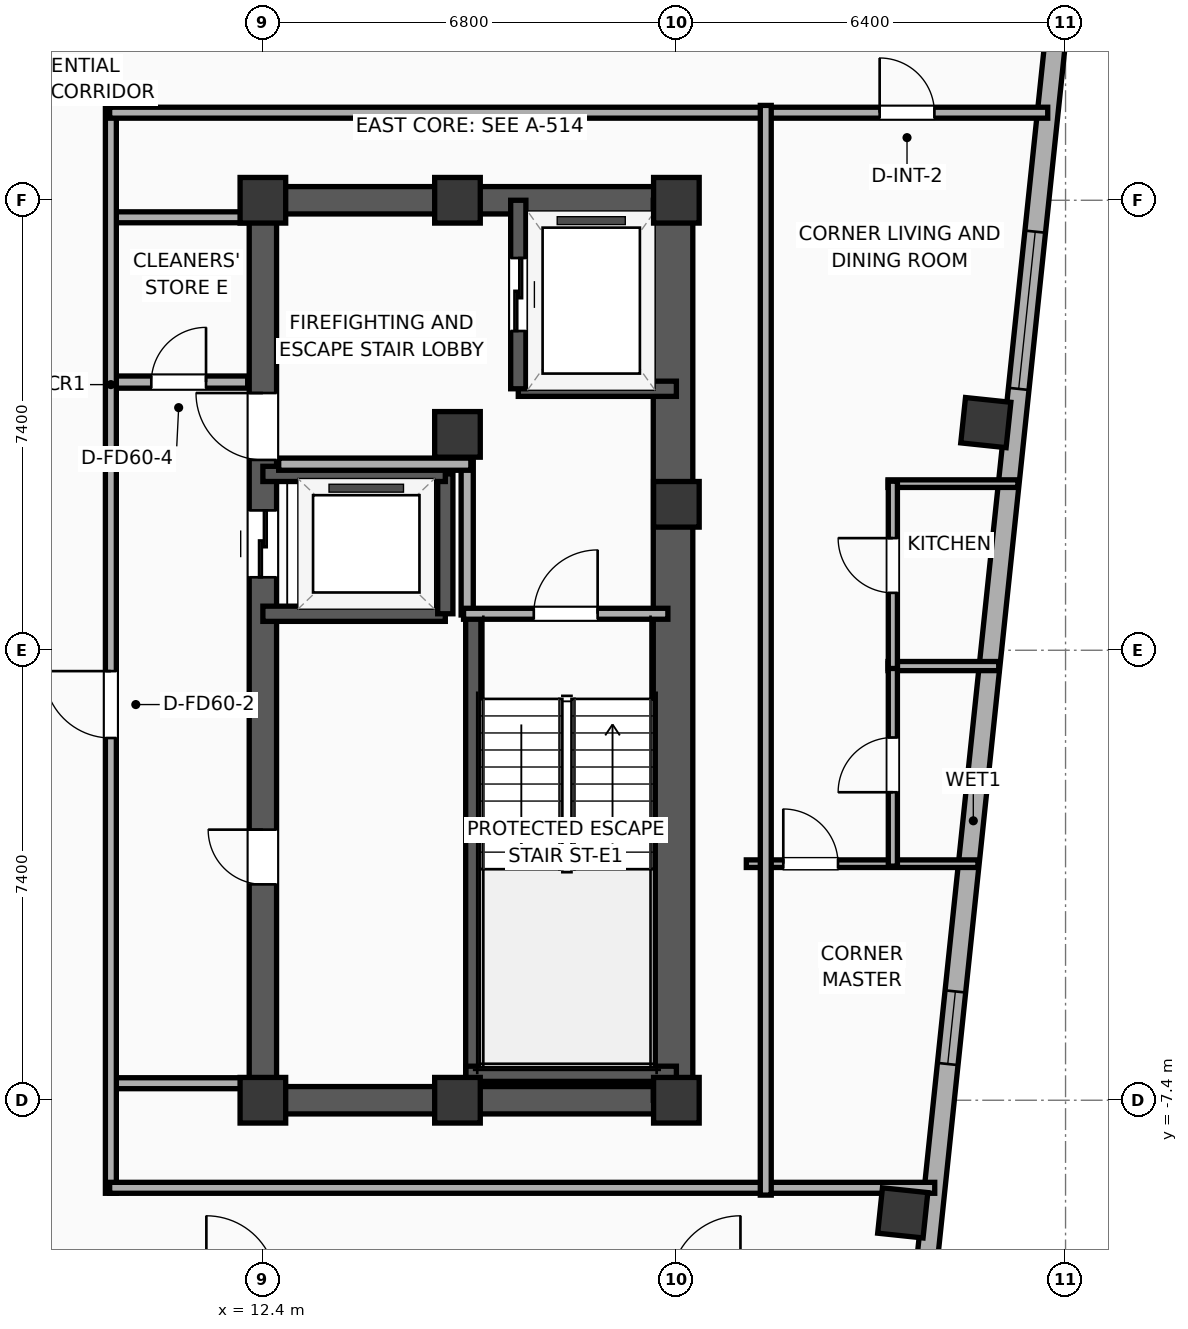
"""IFC4 building model, lengths in metres.
Left out: names, types, materials, properties, quantities, classifications, styles, units other than length and angle.
Written with IfcOpenShell. Run it as: python <this file> out.ifc"""

import sys

from ifc_helpers import new_model, si_unit, direction, frame, frame_2d, origin, origin_2d, place, context, subcontext, project, spatial, rectangle, hollow_rectangle, extrude, element, fill, save


model = new_model("IFC4")
c1 = context("Model", 3, precision=1e-05, world=origin(), true_north=direction((0.0, 1.0)))
c2 = subcontext(c1, "Body", "Model", "MODEL_VIEW")
j1 = project(units=[si_unit("LENGTHUNIT", "METRE"), si_unit("PLANEANGLEUNIT", "RADIAN")], contexts=[c1])
p1 = place(None, origin())
s1 = spatial("IfcSite", under=j1, at=p1, CompositionType="ELEMENT")
p2 = place(p1, origin())
s2 = spatial("IfcBuilding", under=s1, at=p2, CompositionType="ELEMENT")
p3 = place(p2, frame((0.0, 0.0, 306.8)))
s3 = spatial("IfcBuildingStorey", under=s2, at=p3, CompositionType="ELEMENT", Elevation=306.8)
for number, where, z_axis, x_axis in (
    (1, (12.4, -7.4, 0.0), (0.0, 0.0, 1.0), (1.0, 0.0, 0.0)),
    (2, (15.6, 3.55, 0.0), (0.0, 0.0, 1.0), (1.0, 0.0, 0.0)),
    (3, (12.4, 7.4, 0.0), (0.0, 0.0, 1.0), (1.0, 0.0, 0.0)),
    (4, (15.6, -7.4, 0.0), (0.0, 0.0, 1.0), (1.0, 0.0, 0.0)),
    (5, (15.6, 7.4, 0.0), (0.0, 0.0, 1.0), (1.0, 0.0, 0.0)),
    (6, (19.2, -7.4, 0.0), (0.0, 0.0, 1.0), (1.0, 0.0, 0.0)),
    (7, (19.2, 2.4, 0.0), (0.0, 0.0, 1.0), (1.0, 0.0, 0.0)),
    (8, (19.2, 7.4, 0.0), (0.0, 0.0, 1.0), (1.0, 0.0, 0.0)),
):
    element("IfcColumn", number, at=place(p3, frame(where, z_axis=z_axis, x_axis=x_axis)), inside=s3, PredefinedType="COLUMN", context=c2, shape_type="SweptSolid", body=[
        extrude(rectangle(XDim=0.75, YDim=0.75, at=origin_2d()), origin(), (0.0, 0.0, 1.0), 3.9),
    ])
for number, where, z_axis, x_axis in (
    (9, (12.175, -7.4, 0.0), (0.0, 0.0, 1.0), (1.0, 0.0, 0.0)),
    (10, (12.175, 7.4, 0.0), (0.0, 0.0, 1.0), (1.0, 0.0, 0.0)),
):
    element("IfcWall", number, at=place(p3, frame(where, z_axis=z_axis, x_axis=x_axis)), inside=s3, PredefinedType="SHEAR", context=c2, shape_type="SweptSolid", body=[
        extrude(rectangle(XDim=7.25, YDim=0.45, at=frame_2d((3.625, 0.0))), origin(), (0.0, 0.0, 1.0), 3.5),
    ])
p4 = place(p3, frame((12.4, -7.4, 0.0), z_axis=(0.0, 0.0, 1.0), x_axis=(0.0, 1.0, 0.0)))
e11 = element("IfcWall", 11, at=p4, inside=s3, PredefinedType="SHEAR", context=c2, shape_type="SweptSolid", body=[
    extrude(rectangle(XDim=14.8, YDim=0.45, at=frame_2d((7.4, 0.0))), origin(), (0.0, 0.0, 1.0), 3.5),
])
p5 = place(p4, frame((8.6, 0.0, 0.0)))
e12 = element("IfcOpeningElement", 12, at=p5, cuts=e11, PredefinedType="OPENING", context=c2, shape_type="SweptSolid", body=[
    extrude(rectangle(XDim=1.1, YDim=2.05, at=frame_2d((0.55, 1.025))), frame((0.0, 0.235, 0.0), z_axis=(0.0, -1.0, 0.0), x_axis=(1.0, 0.0, 0.0)), (0.0, 0.0, 1.0), 0.47),
])
p6 = place(p4, frame((10.53, 0.0, 0.0)))
e13 = element("IfcOpeningElement", 13, at=p6, cuts=e11, PredefinedType="OPENING", context=c2, shape_type="SweptSolid", body=[
    extrude(rectangle(XDim=1.1, YDim=2.05, at=frame_2d((0.55, 1.025))), frame((0.0, 0.235, 0.0), z_axis=(0.0, -1.0, 0.0), x_axis=(1.0, 0.0, 0.0)), (0.0, 0.0, 1.0), 0.47),
])
p7 = place(p4, frame((3.55, 0.0, 0.0)))
e14 = element("IfcOpeningElement", 14, at=p7, cuts=e11, PredefinedType="OPENING", context=c2, shape_type="SweptSolid", body=[
    extrude(rectangle(XDim=0.9, YDim=2.05, at=frame_2d((0.45, 1.025))), frame((0.0, 0.235, 0.0), z_axis=(0.0, -1.0, 0.0), x_axis=(1.0, 0.0, 0.0)), (0.0, 0.0, 1.0), 0.47),
])
p8 = place(p3, frame((19.145, -7.4, 0.0), z_axis=(0.0, 0.0, 1.0), x_axis=(0.0, 1.0, 0.0)))
e15 = element("IfcWall", 15, at=p8, inside=s3, PredefinedType="SHEAR", context=c2, shape_type="SweptSolid", body=[
    extrude(rectangle(XDim=14.8, YDim=0.65, at=frame_2d((7.4, 0.0))), origin(), (0.0, 0.0, 1.0), 3.5),
])
p9 = place(p3, frame((15.86, -7.085, 0.0), z_axis=(0.0, 0.0, 1.0), x_axis=(0.0, 1.0, 0.0)))
e16 = element("IfcWall", 16, at=p9, inside=s3, PredefinedType="SOLIDWALL", context=c2, shape_type="SweptSolid", body=[
    extrude(rectangle(XDim=7.685, YDim=0.25, at=frame_2d((3.843, 0.0))), origin(), (0.0, 0.0, 1.0), 3.5),
])
p10 = place(p3, frame((15.74, -6.965, 0.0), z_axis=(0.0, 0.0, 1.0), x_axis=(1.0, 0.0, 0.0)))
e17 = element("IfcWall", 17, at=p10, inside=s3, PredefinedType="SOLIDWALL", context=c2, shape_type="SweptSolid", body=[
    extrude(rectangle(XDim=3.46, YDim=0.25, at=frame_2d((1.73, 0.0))), origin(), (0.0, 0.0, 1.0), 3.5),
])
for number, where, z_axis, x_axis in (
    (18, (22.923, -9.252, 0.0), (0.0, 0.0, 1.0), (0.995, -0.105, 0.0)),
    (19, (24.289, 3.744, 0.0), (0.0, 0.0, 1.0), (0.995, -0.105, 0.0)),
):
    element("IfcColumn", number, at=place(p3, frame(where, z_axis=z_axis, x_axis=x_axis)), inside=s3, PredefinedType="COLUMN", context=c2, shape_type="SweptSolid", body=[
        extrude(hollow_rectangle(XDim=0.75, YDim=0.75, WallThickness=0.025, at=origin_2d()), origin(), (0.0, 0.0, 1.0), 3.865),
    ])
p11 = place(p3, frame((25.67, 12.296, 0.0), z_axis=(0.0, 0.0, 1.0), x_axis=(-0.104533282919, -0.994521388791, 0.0)))
e20 = element("IfcWall", 20, at=p11, inside=s3, PredefinedType="ELEMENTEDWALL", context=c2, shape_type="SweptSolid", body=[
    extrude(rectangle(XDim=30.366, YDim=0.34, at=frame_2d((15.183, 0.0))), origin(), (0.0, 0.0, 1.0), 2.39),
])
p12 = place(p11, frame((5.442, 0.0, 0.65)))
e21 = element("IfcOpeningElement", 21, at=p12, cuts=e20, PredefinedType="OPENING", context=c2, shape_type="SweptSolid", body=[
    extrude(rectangle(XDim=2.6, YDim=1.45, at=frame_2d((1.3, 0.725))), frame((0.0, 0.18, 0.0), z_axis=(0.0, -1.0, 0.0), x_axis=(1.0, 0.0, 0.0)), (0.0, 0.0, 1.0), 0.36),
])
p13 = place(p11, frame((23.125, 0.0, 0.65)))
e22 = element("IfcOpeningElement", 22, at=p13, cuts=e20, PredefinedType="OPENING", context=c2, shape_type="SweptSolid", body=[
    extrude(rectangle(XDim=2.6, YDim=1.45, at=frame_2d((1.3, 0.725))), frame((0.0, 0.18, 0.0), z_axis=(0.0, -1.0, 0.0), x_axis=(1.0, 0.0, 0.0)), (0.0, 0.0, 1.0), 0.36),
])
p14 = place(p11, frame((27.192, 0.0, 0.55)))
e23 = element("IfcOpeningElement", 23, at=p14, cuts=e20, PredefinedType="OPENING", context=c2, shape_type="SweptSolid", body=[
    extrude(rectangle(XDim=1.2, YDim=1.15, at=frame_2d((0.6, 0.575))), frame((0.0, 0.18, 0.0), z_axis=(0.0, -1.0, 0.0), x_axis=(1.0, 0.0, 0.0)), (0.0, 0.0, 1.0), 0.36),
])
p15 = place(p11, frame((18.005, 0.0, 0.55)))
e24 = element("IfcOpeningElement", 24, at=p15, cuts=e20, PredefinedType="OPENING", context=c2, shape_type="SweptSolid", body=[
    extrude(rectangle(XDim=1.2, YDim=1.15, at=frame_2d((0.6, 0.575))), frame((0.0, 0.18, 0.0), z_axis=(0.0, -1.0, 0.0), x_axis=(1.0, 0.0, 0.0)), (0.0, 0.0, 1.0), 0.36),
])
p16 = place(p3, frame((16.6, 4.3, 0.0), z_axis=(0.0, 0.0, 1.0), x_axis=(1.0, 0.0, 0.0)))
e25 = element("IfcWall", 25, at=p16, inside=s3, PredefinedType="SOLIDWALL", context=c2, shape_type="SweptSolid", body=[
    extrude(rectangle(XDim=2.6, YDim=0.25, at=frame_2d((1.3, 0.0))), origin(), (0.0, 0.0, 1.0), 3.5),
])
p17 = place(p3, frame((16.6, 7.4, 0.0), z_axis=(0.0, 0.0, 1.0), x_axis=(0.0, -1.0, 0.0)))
e26 = element("IfcWall", 26, at=p17, inside=s3, PredefinedType="SOLIDWALL", context=c2, shape_type="SweptSolid", body=[
    extrude(rectangle(XDim=3.1, YDim=0.25, at=frame_2d((1.55, 0.0))), origin(), (0.0, 0.0, 1.0), 3.5),
])
p18 = place(p17, frame((0.95, 0.0, 0.0)))
e27 = element("IfcOpeningElement", 27, at=p18, cuts=e26, PredefinedType="OPENING", context=c2, shape_type="SweptSolid", body=[
    extrude(rectangle(XDim=1.2, YDim=2.05, at=frame_2d((0.6, 1.025))), frame((0.0, 0.135, 0.0), z_axis=(0.0, -1.0, 0.0), x_axis=(1.0, 0.0, 0.0)), (0.0, 0.0, 1.0), 0.27),
])
p19 = place(p3, frame((12.4, 0.6, 0.0), z_axis=(0.0, 0.0, 1.0), x_axis=(1.0, 0.0, 0.0)))
e28 = element("IfcWall", 28, at=p19, inside=s3, PredefinedType="SOLIDWALL", context=c2, shape_type="SweptSolid", body=[
    extrude(rectangle(XDim=3.0, YDim=0.25, at=frame_2d((1.5, 0.0))), origin(), (0.0, 0.0, 1.0), 3.5),
])
p20 = place(p3, frame((15.4, 0.6, 0.0), z_axis=(0.0, 0.0, 1.0), x_axis=(0.0, 1.0, 0.0)))
e29 = element("IfcWall", 29, at=p20, inside=s3, PredefinedType="SOLIDWALL", context=c2, shape_type="SweptSolid", body=[
    extrude(rectangle(XDim=2.3, YDim=0.25, at=frame_2d((1.15, 0.0))), origin(), (0.0, 0.0, 1.0), 3.5),
])
p21 = place(p3, frame((15.4, 2.9, 0.0), z_axis=(0.0, 0.0, 1.0), x_axis=(-1.0, 0.0, 0.0)))
e30 = element("IfcWall", 30, at=p21, inside=s3, PredefinedType="SOLIDWALL", context=c2, shape_type="SweptSolid", body=[
    extrude(rectangle(XDim=3.0, YDim=0.25, at=frame_2d((1.5, 0.0))), origin(), (0.0, 0.0, 1.0), 3.5),
])
p22 = place(p3, frame((15.76, 0.58, 0.0), z_axis=(0.0, 0.0, 1.0), x_axis=(0.0, 1.0, 0.0)))
e31 = element("IfcWall", 31, at=p22, inside=s3, PredefinedType="PARTITIONING", context=c2, shape_type="SweptSolid", body=[
    extrude(rectangle(XDim=2.52, YDim=0.2, at=frame_2d((1.26, 0.0))), origin(), (0.0, 0.0, 1.0), 3.5),
])
p23 = place(p3, frame((12.66, 3.06, 0.0), z_axis=(0.0, 0.0, 1.0), x_axis=(1.0, 0.0, 0.0)))
e32 = element("IfcWall", 32, at=p23, inside=s3, PredefinedType="PARTITIONING", context=c2, shape_type="SweptSolid", body=[
    extrude(rectangle(XDim=3.16, YDim=0.2, at=frame_2d((1.58, 0.0))), origin(), (0.0, 0.0, 1.0), 3.5),
])
p24 = place(p3, frame((15.7, 0.6, 0.0), z_axis=(0.0, 0.0, 1.0), x_axis=(1.0, 0.0, 0.0)))
e33 = element("IfcWall", 33, at=p24, inside=s3, PredefinedType="PARTITIONING", context=c2, shape_type="SweptSolid", body=[
    extrude(rectangle(XDim=3.36, YDim=0.18, at=frame_2d((1.68, 0.0))), origin(), (0.0, 0.0, 1.0), 3.5),
])
p25 = place(p24, frame((1.155, 0.0, 0.0)))
e34 = element("IfcOpeningElement", 34, at=p25, cuts=e33, PredefinedType="OPENING", context=c2, shape_type="SweptSolid", body=[
    extrude(rectangle(XDim=1.05, YDim=2.05, at=frame_2d((0.525, 1.025))), frame((0.0, 0.1, 0.0), z_axis=(0.0, -1.0, 0.0), x_axis=(1.0, 0.0, 0.0)), (0.0, 0.0, 1.0), 0.2),
])
p26 = place(p3, frame((9.88, 4.41, 0.0), z_axis=(0.0, 0.0, 1.0), x_axis=(1.0, 0.0, 0.0)))
e35 = element("IfcWall", 35, at=p26, inside=s3, PredefinedType="PARTITIONING", context=c2, shape_type="SweptSolid", body=[
    extrude(rectangle(XDim=2.27, YDim=0.2, at=frame_2d((1.135, 0.0))), origin(), (0.0, 0.0, 1.0), 3.5),
])
p27 = place(p26, frame((0.685, 0.0, 0.0)))
e36 = element("IfcOpeningElement", 36, at=p27, cuts=e35, PredefinedType="OPENING", context=c2, shape_type="SweptSolid", body=[
    extrude(rectangle(XDim=0.9, YDim=2.05, at=frame_2d((0.45, 1.025))), frame((0.0, 0.11, 0.0), z_axis=(0.0, -1.0, 0.0), x_axis=(1.0, 0.0, 0.0)), (0.0, 0.0, 1.0), 0.22),
])
for number, where, z_axis, x_axis in (
    (37, (9.88, 7.12, 0.0), (0.0, 0.0, 1.0), (1.0, 0.0, 0.0)),
    (38, (9.88, -7.12, 0.0), (0.0, 0.0, 1.0), (1.0, 0.0, 0.0)),
):
    element("IfcWall", number, at=place(p3, frame(where, z_axis=z_axis, x_axis=x_axis)), inside=s3, PredefinedType="PARTITIONING", context=c2, shape_type="SweptSolid", body=[
        extrude(rectangle(XDim=2.27, YDim=0.18, at=frame_2d((1.135, 0.0))), origin(), (0.0, 0.0, 1.0), 2.54),
    ])
p28 = place(p3, frame((9.9, -8.93, 0.0), z_axis=(0.0, 0.0, 1.0), x_axis=(0.0, 1.0, 0.0)))
e39 = element("IfcWall", 39, at=p28, inside=s3, PredefinedType="PARTITIONING", context=c2, shape_type="SweptSolid", body=[
    extrude(rectangle(XDim=17.86, YDim=0.18, at=frame_2d((8.93, 0.0))), origin(), (0.0, 0.0, 1.0), 3.5),
])
p29 = place(p28, frame((7.487, 0.0, 0.0)))
e40 = element("IfcOpeningElement", 40, at=p29, cuts=e39, PredefinedType="OPENING", context=c2, shape_type="SweptSolid", body=[
    extrude(rectangle(XDim=1.1, YDim=2.05, at=frame_2d((0.55, 1.025))), frame((0.0, 0.1, 0.0), z_axis=(0.0, -1.0, 0.0), x_axis=(1.0, 0.0, 0.0)), (0.0, 0.0, 1.0), 0.2),
])
p30 = place(p3, frame((9.88, 8.84, 0.0), z_axis=(0.0, 0.0, 1.0), x_axis=(1.0, 0.0, 0.0)))
e41 = element("IfcWall", 41, at=p30, inside=s3, PredefinedType="PARTITIONING", context=c2, shape_type="SweptSolid", body=[
    extrude(rectangle(XDim=15.427, YDim=0.18, at=frame_2d((7.713, 0.0))), origin(), (0.0, 0.0, 1.0), 3.5),
])
p31 = place(p30, frame((12.663, 0.0, 0.0)))
e42 = element("IfcOpeningElement", 42, at=p31, cuts=e41, PredefinedType="OPENING", context=c2, shape_type="SweptSolid", body=[
    extrude(rectangle(XDim=0.9, YDim=2.05, at=frame_2d((0.45, 1.025))), frame((0.0, 0.1, 0.0), z_axis=(0.0, -1.0, 0.0), x_axis=(1.0, 0.0, 0.0)), (0.0, 0.0, 1.0), 0.2),
])
p32 = place(p3, frame((9.88, -8.84, 0.0), z_axis=(0.0, 0.0, 1.0), x_axis=(1.0, 0.0, 0.0)))
e43 = element("IfcWall", 43, at=p32, inside=s3, PredefinedType="PARTITIONING", context=c2, shape_type="SweptSolid", body=[
    extrude(rectangle(XDim=13.569, YDim=0.18, at=frame_2d((6.784, 0.0))), origin(), (0.0, 0.0, 1.0), 2.39),
])
p33 = place(p3, frame((22.68, 2.74, 0.0), z_axis=(0.0, 0.0, 1.0), x_axis=(1.0, 0.0, 0.0)))
e44 = element("IfcWall", 44, at=p33, inside=s3, PredefinedType="PARTITIONING", context=c2, shape_type="SweptSolid", body=[
    extrude(rectangle(XDim=2.137, YDim=0.125, at=frame_2d((1.068, 0.0))), origin(), (0.0, 0.0, 1.0), 3.5),
])
p34 = place(p3, frame((22.68, -0.26, 0.0), z_axis=(0.0, 0.0, 1.0), x_axis=(1.0, 0.0, 0.0)))
e45 = element("IfcWall", 45, at=p34, inside=s3, PredefinedType="PLUMBINGWALL", context=c2, shape_type="SweptSolid", body=[
    extrude(rectangle(XDim=1.821, YDim=0.15, at=frame_2d((0.911, 0.0))), origin(), (0.0, 0.0, 1.0), 3.5),
])
p35 = place(p3, frame((20.35, -3.51, 0.0), z_axis=(0.0, 0.0, 1.0), x_axis=(1.0, 0.0, 0.0)))
e46 = element("IfcWall", 46, at=p35, inside=s3, PredefinedType="PARTITIONING", context=c2, shape_type="SweptSolid", body=[
    extrude(rectangle(XDim=3.81, YDim=0.125, at=frame_2d((1.905, 0.0))), origin(), (0.0, 0.0, 1.0), 3.5),
])
p36 = place(p35, frame((0.608, 0.0, 0.0)))
e47 = element("IfcOpeningElement", 47, at=p36, cuts=e46, PredefinedType="OPENING", context=c2, shape_type="SweptSolid", body=[
    extrude(rectangle(XDim=0.9, YDim=2.05, at=frame_2d((0.45, 1.025))), frame((0.0, 0.073, 0.0), z_axis=(0.0, -1.0, 0.0), x_axis=(1.0, 0.0, 0.0)), (0.0, 0.0, 1.0), 0.145),
])
p37 = place(p3, frame((22.76, -3.55, 0.0), z_axis=(0.0, 0.0, 1.0), x_axis=(0.0, 1.0, 0.0)))
e48 = element("IfcWall", 48, at=p37, inside=s3, PredefinedType="PLUMBINGWALL", context=c2, shape_type="SweptSolid", body=[
    extrude(rectangle(XDim=3.33, YDim=0.15, at=frame_2d((1.665, 0.0))), origin(), (0.0, 0.0, 1.0), 3.5),
])
p38 = place(p37, frame((1.215, 0.0, 0.0)))
e49 = element("IfcOpeningElement", 49, at=p38, cuts=e48, PredefinedType="OPENING", context=c2, shape_type="SweptSolid", body=[
    extrude(rectangle(XDim=0.9, YDim=2.05, at=frame_2d((0.45, 1.025))), frame((0.0, 0.085, 0.0), z_axis=(0.0, -1.0, 0.0), x_axis=(1.0, 0.0, 0.0)), (0.0, 0.0, 1.0), 0.17),
])
p39 = place(p3, frame((22.76, -0.3, 0.0), z_axis=(0.0, 0.0, 1.0), x_axis=(0.0, 1.0, 0.0)))
e50 = element("IfcWall", 50, at=p39, inside=s3, PredefinedType="PLUMBINGWALL", context=c2, shape_type="SweptSolid", body=[
    extrude(rectangle(XDim=3.08, YDim=0.15, at=frame_2d((1.54, 0.0))), origin(), (0.0, 0.0, 1.0), 3.5),
])
p40 = place(p39, frame((1.244, 0.0, 0.0)))
e51 = element("IfcOpeningElement", 51, at=p40, cuts=e50, PredefinedType="OPENING", context=c2, shape_type="SweptSolid", body=[
    extrude(rectangle(XDim=0.9, YDim=2.05, at=frame_2d((0.45, 1.025))), frame((0.0, 0.085, 0.0), z_axis=(0.0, -1.0, 0.0), x_axis=(1.0, 0.0, 0.0)), (0.0, 0.0, 1.0), 0.17),
])
p41 = place(p3, frame((20.67, -8.96, 0.0), z_axis=(0.0, 0.0, 1.0), x_axis=(0.0, 1.0, 0.0)))
e52 = element("IfcWall", 52, at=p41, inside=s3, PredefinedType="PARTITIONING", context=c2, shape_type="SweptSolid", body=[
    extrude(rectangle(XDim=17.92, YDim=0.18, at=frame_2d((8.96, 0.0))), origin(), (0.0, 0.0, 1.0), 3.5),
])
p42 = place(p12, origin())
e53 = element("IfcWindow", 53, at=p42, inside=s3, PartitioningType="SINGLE_PANEL", PredefinedType="WINDOW", context=c2, shape_type="SweptSolid", body=[
    extrude(rectangle(XDim=2.6, YDim=1.45, at=frame_2d((1.3, 0.725))), frame((0.0, 0.03, 0.0), z_axis=(0.0, -1.0, 0.0), x_axis=(1.0, 0.0, 0.0)), (0.0, 0.0, 1.0), 0.06),
])
fill(e21, e53)
p43 = place(p15, origin())
e54 = element("IfcWindow", 54, at=p43, inside=s3, PartitioningType="SINGLE_PANEL", PredefinedType="WINDOW", context=c2, shape_type="SweptSolid", body=[
    extrude(rectangle(XDim=1.2, YDim=1.15, at=frame_2d((0.6, 0.575))), frame((0.0, 0.03, 0.0), z_axis=(0.0, -1.0, 0.0), x_axis=(1.0, 0.0, 0.0)), (0.0, 0.0, 1.0), 0.06),
])
fill(e24, e54)
p44 = place(p18, origin())
e55 = element("IfcDoor", 55, at=p44, inside=s3, OperationType="SLIDING_TO_LEFT", PredefinedType="DOOR", context=c2, shape_type="SweptSolid", body=[
    extrude(rectangle(XDim=1.2, YDim=2.05, at=frame_2d((0.6, 1.025))), frame((0.0, 0.025, 0.0), z_axis=(0.0, -1.0, 0.0), x_axis=(1.0, 0.0, 0.0)), (0.0, 0.0, 1.0), 0.05),
])
fill(e27, e55)
p45 = place(p5, origin())
e56 = element("IfcDoor", 56, at=p45, inside=s3, OperationType="SLIDING_TO_LEFT", PredefinedType="DOOR", context=c2, shape_type="SweptSolid", body=[
    extrude(rectangle(XDim=1.1, YDim=2.05, at=frame_2d((0.55, 1.025))), frame((0.0, 0.025, 0.0), z_axis=(0.0, -1.0, 0.0), x_axis=(1.0, 0.0, 0.0)), (0.0, 0.0, 1.0), 0.05),
])
fill(e12, e56)
p46 = place(p25, origin())
e57 = element("IfcDoor", 57, at=p46, inside=s3, OperationType="SINGLE_SWING_RIGHT", PredefinedType="DOOR", context=c2, shape_type="SweptSolid", body=[
    extrude(rectangle(XDim=1.05, YDim=2.05, at=frame_2d((0.525, 1.025))), frame((0.0, 0.025, 0.0), z_axis=(0.0, -1.0, 0.0), x_axis=(1.0, 0.0, 0.0)), (0.0, 0.0, 1.0), 0.05),
])
fill(e34, e57)
p47 = place(p27, origin())
e58 = element("IfcDoor", 58, at=p47, inside=s3, OperationType="SINGLE_SWING_RIGHT", PredefinedType="DOOR", context=c2, shape_type="SweptSolid", body=[
    extrude(rectangle(XDim=0.9, YDim=2.05, at=frame_2d((0.45, 1.025))), frame((0.0, 0.025, 0.0), z_axis=(0.0, -1.0, 0.0), x_axis=(1.0, 0.0, 0.0)), (0.0, 0.0, 1.0), 0.05),
])
fill(e36, e58)
p48 = place(p29, origin())
e59 = element("IfcDoor", 59, at=p48, inside=s3, OperationType="SINGLE_SWING_RIGHT", PredefinedType="DOOR", context=c2, shape_type="SweptSolid", body=[
    extrude(rectangle(XDim=1.1, YDim=2.05, at=frame_2d((0.55, 1.025))), frame((0.0, 0.025, 0.0), z_axis=(0.0, -1.0, 0.0), x_axis=(1.0, 0.0, 0.0)), (0.0, 0.0, 1.0), 0.05),
])
fill(e40, e59)
p49 = place(p31, origin())
e60 = element("IfcDoor", 60, at=p49, inside=s3, OperationType="SINGLE_SWING_LEFT", PredefinedType="DOOR", context=c2, shape_type="SweptSolid", body=[
    extrude(rectangle(XDim=0.9, YDim=2.05, at=frame_2d((0.45, 1.025))), frame((0.0, 0.025, 0.0), z_axis=(0.0, -1.0, 0.0), x_axis=(1.0, 0.0, 0.0)), (0.0, 0.0, 1.0), 0.05),
])
fill(e42, e60)
p50 = place(p36, origin())
e61 = element("IfcDoor", 61, at=p50, inside=s3, OperationType="SINGLE_SWING_LEFT", PredefinedType="DOOR", context=c2, shape_type="SweptSolid", body=[
    extrude(rectangle(XDim=0.9, YDim=2.05, at=frame_2d((0.45, 1.025))), frame((0.0, 0.025, 0.0), z_axis=(0.0, -1.0, 0.0), x_axis=(1.0, 0.0, 0.0)), (0.0, 0.0, 1.0), 0.05),
])
fill(e47, e61)
p51 = place(p38, origin())
e62 = element("IfcDoor", 62, at=p51, inside=s3, OperationType="SINGLE_SWING_LEFT", PredefinedType="DOOR", context=c2, shape_type="SweptSolid", body=[
    extrude(rectangle(XDim=0.9, YDim=2.05, at=frame_2d((0.45, 1.025))), frame((0.0, 0.025, 0.0), z_axis=(0.0, -1.0, 0.0), x_axis=(1.0, 0.0, 0.0)), (0.0, 0.0, 1.0), 0.05),
])
fill(e49, e62)
p52 = place(p40, origin())
e63 = element("IfcDoor", 63, at=p52, inside=s3, OperationType="SINGLE_SWING_RIGHT", PredefinedType="DOOR", context=c2, shape_type="SweptSolid", body=[
    extrude(rectangle(XDim=0.9, YDim=2.05, at=frame_2d((0.45, 1.025))), frame((0.0, 0.025, 0.0), z_axis=(0.0, -1.0, 0.0), x_axis=(1.0, 0.0, 0.0)), (0.0, 0.0, 1.0), 0.05),
])
fill(e51, e63)
p53 = place(p6, origin())
e64 = element("IfcDoor", 64, at=p53, inside=s3, OperationType="SINGLE_SWING_RIGHT", PredefinedType="DOOR", context=c2, shape_type="SweptSolid", body=[
    extrude(rectangle(XDim=1.1, YDim=2.05, at=frame_2d((0.55, 1.025))), frame((0.0, 0.025, 0.0), z_axis=(0.0, -1.0, 0.0), x_axis=(1.0, 0.0, 0.0)), (0.0, 0.0, 1.0), 0.05),
])
fill(e13, e64)
p54 = place(p7, origin())
e65 = element("IfcDoor", 65, at=p54, inside=s3, OperationType="SINGLE_SWING_RIGHT", PredefinedType="DOOR", context=c2, shape_type="SweptSolid", body=[
    extrude(rectangle(XDim=0.9, YDim=2.05, at=frame_2d((0.45, 1.025))), frame((0.0, 0.025, 0.0), z_axis=(0.0, -1.0, 0.0), x_axis=(1.0, 0.0, 0.0)), (0.0, 0.0, 1.0), 0.05),
])
fill(e14, e65)
save(model, sys.argv[1])
